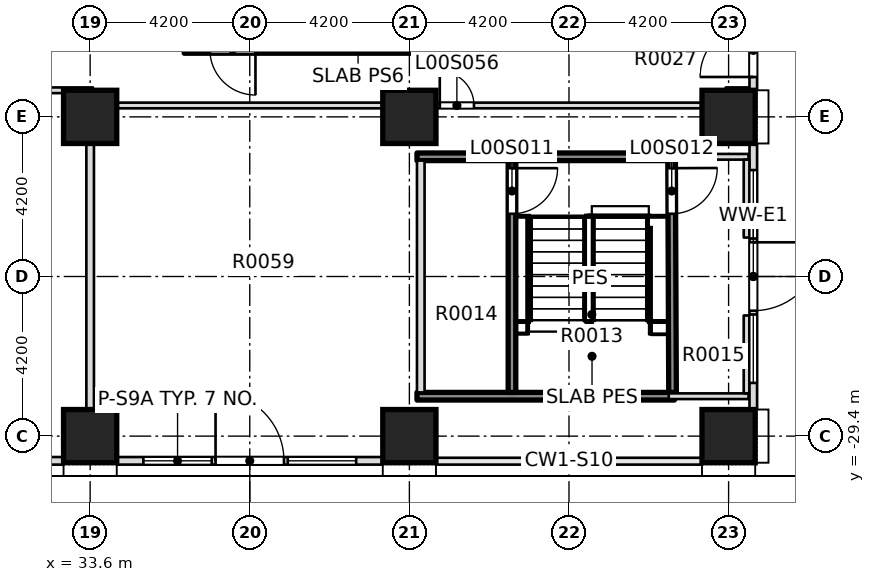
"""IFC4 building model, lengths in metres.
Left out: names, types, materials, properties, quantities, classifications, styles, units other than length and angle.
Written with IfcOpenShell. Run it as: python <this file> out.ifc"""

import sys

from ifc_helpers import new_model, si_unit, direction, frame, frame_2d, origin, origin_2d, place, context, subcontext, project, spatial, rectangle, extrude, element, fill, save


model = new_model("IFC4")
c1 = context("Model", 3, precision=1e-05, world=origin(), true_north=direction((0.0, 1.0)))
c2 = subcontext(c1, "Body", "Model", "MODEL_VIEW")
j1 = project(units=[si_unit("LENGTHUNIT", "METRE"), si_unit("PLANEANGLEUNIT", "RADIAN")], contexts=[c1])
p1 = place(None, origin())
s1 = spatial("IfcSite", under=j1, at=p1, CompositionType="ELEMENT")
p2 = place(p1, origin())
s2 = spatial("IfcBuilding", under=s1, at=p2, CompositionType="ELEMENT")
p3 = place(p2, origin())
s3 = spatial("IfcBuildingStorey", under=s2, at=p3, CompositionType="ELEMENT", Elevation=0.0)
for number, where, z_axis, x_axis in (
    (1, (33.6, -29.4, 0.0), (0.0, 0.0, 1.0), (1.0, 0.0, 0.0)),
    (2, (42.0, -29.4, 0.0), (0.0, 0.0, 1.0), (1.0, 0.0, 0.0)),
    (3, (50.4, -29.4, 0.0), (0.0, 0.0, 1.0), (1.0, 0.0, 0.0)),
    (4, (33.6, -21.0, 0.0), (0.0, 0.0, 1.0), (1.0, 0.0, 0.0)),
    (5, (42.0, -21.0, 0.0), (0.0, 0.0, 1.0), (1.0, 0.0, 0.0)),
    (6, (50.4, -21.0, 0.0), (0.0, 0.0, 1.0), (1.0, 0.0, 0.0)),
):
    element("IfcColumn", number, at=place(p3, frame(where, z_axis=z_axis, x_axis=x_axis)), inside=s3, PredefinedType="COLUMN", context=c2, shape_type="SweptSolid", body=[
        extrude(rectangle(XDim=1.4, YDim=1.4, at=origin_2d()), origin(), (0.0, 0.0, 1.0), 7.5),
    ])
p4 = place(p3, frame((42.2, -28.35, 0.0), z_axis=(0.0, 0.0, 1.0), x_axis=(1.0, 0.0, 0.0)))
e7 = element("IfcWall", 7, at=p4, inside=s3, PredefinedType="SOLIDWALL", context=c2, shape_type="SweptSolid", body=[
    extrude(rectangle(XDim=6.775, YDim=0.2, at=frame_2d((3.388, 0.0))), origin(), (0.0, 0.0, 1.0), 7.1),
])
p5 = place(p3, frame((48.825, -28.35, 0.0), z_axis=(0.0, 0.0, 1.0), x_axis=(1.0, 0.0, 0.0)))
e8 = element("IfcWall", 8, at=p5, inside=s3, PredefinedType="PARTITIONING", context=c2, shape_type="SweptSolid", body=[
    extrude(rectangle(XDim=2.1, YDim=0.15, at=frame_2d((1.05, 0.0))), origin(), (0.0, 0.0, 1.0), 7.1),
])
p6 = place(p3, frame((42.2, -22.05, 0.0), z_axis=(0.0, 0.0, 1.0), x_axis=(1.0, 0.0, 0.0)))
e9 = element("IfcWall", 9, at=p6, inside=s3, PredefinedType="SOLIDWALL", context=c2, shape_type="SweptSolid", body=[
    extrude(rectangle(XDim=6.775, YDim=0.2, at=frame_2d((3.388, 0.0))), origin(), (0.0, 0.0, 1.0), 7.1),
])
p7 = place(p3, frame((48.825, -22.05, 0.0), z_axis=(0.0, 0.0, 1.0), x_axis=(1.0, 0.0, 0.0)))
e10 = element("IfcWall", 10, at=p7, inside=s3, PredefinedType="PARTITIONING", context=c2, shape_type="SweptSolid", body=[
    extrude(rectangle(XDim=2.1, YDim=0.15, at=frame_2d((1.05, 0.0))), origin(), (0.0, 0.0, 1.0), 7.1),
])
p8 = place(p3, frame((33.5, -20.7, 0.0), z_axis=(0.0, 0.0, 1.0), x_axis=(1.0, 0.0, 0.0)))
e11 = element("IfcWall", 11, at=p8, inside=s3, PredefinedType="PARTITIONING", context=c2, shape_type="SweptSolid", body=[
    extrude(rectangle(XDim=16.975, YDim=0.15, at=frame_2d((8.488, 0.0))), origin(), (0.0, 0.0, 1.0), 7.1),
])
p9 = place(p8, frame((9.3, 0.0, 0.0)))
e12 = element("IfcOpeningElement", 12, at=p9, cuts=e11, PredefinedType="OPENING", context=c2, shape_type="SweptSolid", body=[
    extrude(rectangle(XDim=0.9, YDim=2.1, at=frame_2d((0.45, 1.05))), frame((0.0, 0.085, 0.0), z_axis=(0.0, -1.0, 0.0), x_axis=(1.0, 0.0, 0.0)), (0.0, 0.0, 1.0), 0.17),
])
p10 = place(p3, frame((-34.15, -20.3, 0.0), z_axis=(0.0, 0.0, 1.0), x_axis=(1.0, 0.0, 0.0)))
e13 = element("IfcWall", 13, at=p10, inside=s3, PredefinedType="PARTITIONING", context=c2, shape_type="SweptSolid", body=[
    extrude(rectangle(XDim=67.825, YDim=0.15, at=frame_2d((33.913, 0.0))), origin(), (0.0, 0.0, 1.0), 7.1),
])
p11 = place(p10, frame((12.6, 0.0, 0.0)))
e14 = element("IfcOpeningElement", 14, at=p11, cuts=e13, PredefinedType="OPENING", context=c2, shape_type="SweptSolid", body=[
    extrude(rectangle(XDim=1.1, YDim=2.1, at=frame_2d((0.55, 1.05))), frame((0.0, 0.085, 0.0), z_axis=(0.0, -1.0, 0.0), x_axis=(1.0, 0.0, 0.0)), (0.0, 0.0, 1.0), 0.17),
])
p12 = place(p10, frame((2.825, 0.0, 0.0)))
e15 = element("IfcOpeningElement", 15, at=p12, cuts=e13, PredefinedType="OPENING", context=c2, shape_type="SweptSolid", body=[
    extrude(rectangle(XDim=0.9, YDim=2.1, at=frame_2d((0.45, 1.05))), frame((0.0, 0.085, 0.0), z_axis=(0.0, -1.0, 0.0), x_axis=(1.0, 0.0, 0.0)), (0.0, 0.0, 1.0), 0.17),
])
p13 = place(p10, frame((7.25, 0.0, 0.0)))
e16 = element("IfcOpeningElement", 16, at=p13, cuts=e13, PredefinedType="OPENING", context=c2, shape_type="SweptSolid", body=[
    extrude(rectangle(XDim=0.9, YDim=2.1, at=frame_2d((0.45, 1.05))), frame((0.0, 0.085, 0.0), z_axis=(0.0, -1.0, 0.0), x_axis=(1.0, 0.0, 0.0)), (0.0, 0.0, 1.0), 0.17),
])
p14 = place(p10, frame((20.8, 0.0, 0.0)))
e17 = element("IfcOpeningElement", 17, at=p14, cuts=e13, PredefinedType="OPENING", context=c2, shape_type="SweptSolid", body=[
    extrude(rectangle(XDim=0.9, YDim=2.1, at=frame_2d((0.45, 1.05))), frame((0.0, 0.085, 0.0), z_axis=(0.0, -1.0, 0.0), x_axis=(1.0, 0.0, 0.0)), (0.0, 0.0, 1.0), 0.17),
])
p15 = place(p10, frame((27.4, 0.0, 0.0)))
e18 = element("IfcOpeningElement", 18, at=p15, cuts=e13, PredefinedType="OPENING", context=c2, shape_type="SweptSolid", body=[
    extrude(rectangle(XDim=0.9, YDim=2.1, at=frame_2d((0.45, 1.05))), frame((0.0, 0.085, 0.0), z_axis=(0.0, -1.0, 0.0), x_axis=(1.0, 0.0, 0.0)), (0.0, 0.0, 1.0), 0.17),
])
p16 = place(p10, frame((36.25, 0.0, 0.0)))
e19 = element("IfcOpeningElement", 19, at=p16, cuts=e13, PredefinedType="OPENING", context=c2, shape_type="SweptSolid", body=[
    extrude(rectangle(XDim=0.9, YDim=2.1, at=frame_2d((0.45, 1.05))), frame((0.0, 0.085, 0.0), z_axis=(0.0, -1.0, 0.0), x_axis=(1.0, 0.0, 0.0)), (0.0, 0.0, 1.0), 0.17),
])
p17 = place(p10, frame((46.65, 0.0, 0.0)))
e20 = element("IfcOpeningElement", 20, at=p17, cuts=e13, PredefinedType="OPENING", context=c2, shape_type="SweptSolid", body=[
    extrude(rectangle(XDim=0.9, YDim=2.1, at=frame_2d((0.45, 1.05))), frame((0.0, 0.085, 0.0), z_axis=(0.0, -1.0, 0.0), x_axis=(1.0, 0.0, 0.0)), (0.0, 0.0, 1.0), 0.17),
])
p18 = place(p10, frame((54.6, 0.0, 0.0)))
e21 = element("IfcOpeningElement", 21, at=p18, cuts=e13, PredefinedType="OPENING", context=c2, shape_type="SweptSolid", body=[
    extrude(rectangle(XDim=1.1, YDim=2.1, at=frame_2d((0.55, 1.05))), frame((0.0, 0.085, 0.0), z_axis=(0.0, -1.0, 0.0), x_axis=(1.0, 0.0, 0.0)), (0.0, 0.0, 1.0), 0.17),
])
p19 = place(p10, frame((63.1, 0.0, 0.0)))
e22 = element("IfcOpeningElement", 22, at=p19, cuts=e13, PredefinedType="OPENING", context=c2, shape_type="SweptSolid", body=[
    extrude(rectangle(XDim=0.9, YDim=2.1, at=frame_2d((0.45, 1.05))), frame((0.0, 0.085, 0.0), z_axis=(0.0, -1.0, 0.0), x_axis=(1.0, 0.0, 0.0)), (0.0, 0.0, 1.0), 0.17),
])
p20 = place(p3, frame((50.325, -20.3, 0.0), z_axis=(0.0, 0.0, 1.0), x_axis=(1.0, 0.0, 0.0)))
e23 = element("IfcWall", 23, at=p20, inside=s3, PredefinedType="PARTITIONING", context=c2, shape_type="SweptSolid", body=[
    extrude(rectangle(XDim=0.625, YDim=0.15, at=frame_2d((0.312, 0.0))), origin(), (0.0, 0.0, 1.0), 7.1),
])
p21 = place(p3, frame((36.075, -19.225, 0.0), z_axis=(0.0, 0.0, 1.0), x_axis=(1.0, 0.0, 0.0)))
e24 = element("IfcWall", 24, at=p21, inside=s3, PredefinedType="SOLIDWALL", context=c2, shape_type="SweptSolid", body=[
    extrude(rectangle(XDim=6.75, YDim=0.2, at=frame_2d((3.375, 0.0))), origin(), (0.0, 0.0, 1.0), 7.1),
])
p22 = place(p21, frame((0.675, 0.0, 0.0)))
e25 = element("IfcOpeningElement", 25, at=p22, cuts=e24, PredefinedType="OPENING", context=c2, shape_type="SweptSolid", body=[
    extrude(rectangle(XDim=1.2, YDim=2.1, at=frame_2d((0.6, 1.05))), frame((0.0, 0.11, 0.0), z_axis=(0.0, -1.0, 0.0), x_axis=(1.0, 0.0, 0.0)), (0.0, 0.0, 1.0), 0.22),
])
p23 = place(p3, frame((33.6, -29.95, 0.0), z_axis=(0.0, 0.0, 1.0), x_axis=(0.0, 1.0, 0.0)))
e26 = element("IfcWall", 26, at=p23, inside=s3, PredefinedType="PARTITIONING", context=c2, shape_type="SweptSolid", body=[
    extrude(rectangle(XDim=9.175, YDim=0.2, at=frame_2d((4.587, 0.0))), origin(), (0.0, 0.0, 1.0), 7.1),
])
p24 = place(p3, frame((33.6, -20.625, 0.0), z_axis=(0.0, 0.0, 1.0), x_axis=(0.0, 1.0, 0.0)))
e27 = element("IfcWall", 27, at=p24, inside=s3, PredefinedType="PARTITIONING", context=c2, shape_type="SweptSolid", body=[
    extrude(rectangle(XDim=0.25, YDim=0.15, at=frame_2d((0.125, 0.0))), origin(), (0.0, 0.0, 1.0), 7.1),
])
p25 = place(p3, frame((42.3, -28.25, 0.0), z_axis=(0.0, 0.0, 1.0), x_axis=(0.0, 1.0, 0.0)))
e28 = element("IfcWall", 28, at=p25, inside=s3, PredefinedType="PARTITIONING", context=c2, shape_type="SweptSolid", body=[
    extrude(rectangle(XDim=6.1, YDim=0.2, at=frame_2d((3.05, 0.0))), origin(), (0.0, 0.0, 1.0), 7.1),
])
p26 = place(p3, frame((44.7, -28.25, 0.0), z_axis=(0.0, 0.0, 1.0), x_axis=(0.0, 1.0, 0.0)))
e29 = element("IfcWall", 29, at=p26, inside=s3, PredefinedType="SOLIDWALL", context=c2, shape_type="SweptSolid", body=[
    extrude(rectangle(XDim=6.1, YDim=0.2, at=frame_2d((3.05, 0.0))), origin(), (0.0, 0.0, 1.0), 7.1),
])
p27 = place(p26, frame((4.7, 0.0, 0.0)))
e30 = element("IfcOpeningElement", 30, at=p27, cuts=e29, PredefinedType="OPENING", context=c2, shape_type="SweptSolid", body=[
    extrude(rectangle(XDim=1.2, YDim=2.1, at=frame_2d((0.6, 1.05))), frame((0.0, 0.11, 0.0), z_axis=(0.0, -1.0, 0.0), x_axis=(1.0, 0.0, 0.0)), (0.0, 0.0, 1.0), 0.22),
])
p28 = place(p3, frame((48.925, -28.25, 0.0), z_axis=(0.0, 0.0, 1.0), x_axis=(-0.004065655173, 0.99999173519, 0.0)))
e31 = element("IfcWall", 31, at=p28, inside=s3, PredefinedType="SOLIDWALL", context=c2, shape_type="SweptSolid", body=[
    extrude(rectangle(XDim=6.125, YDim=0.2, at=frame_2d((3.062, 0.0))), origin(), (0.0, 0.0, 1.0), 7.1),
])
p29 = place(p28, frame((4.7, 0.0, 0.0)))
e32 = element("IfcOpeningElement", 32, at=p29, cuts=e31, PredefinedType="OPENING", context=c2, shape_type="SweptSolid", body=[
    extrude(rectangle(XDim=1.2, YDim=2.1, at=frame_2d((0.6, 1.05))), frame((0.0, 0.11, 0.0), z_axis=(0.0, -1.0, 0.0), x_axis=(1.0, 0.0, 0.0)), (0.0, 0.0, 1.0), 0.22),
])
p30 = place(p3, frame((50.4, -20.625, 0.0), z_axis=(0.0, 0.0, 1.0), x_axis=(0.0, 1.0, 0.0)))
e33 = element("IfcWall", 33, at=p30, inside=s3, PredefinedType="PARTITIONING", context=c2, shape_type="SweptSolid", body=[
    extrude(rectangle(XDim=0.25, YDim=0.15, at=frame_2d((0.125, 0.0))), origin(), (0.0, 0.0, 1.0), 7.1),
])
p31 = place(p3, frame((50.873, -28.275, 0.0), z_axis=(0.0, 0.0, 1.0), x_axis=(0.0, 1.0, 0.0)))
e34 = element("IfcWall", 34, at=p31, inside=s3, PredefinedType="PARTITIONING", context=c2, shape_type="SweptSolid", body=[
    extrude(rectangle(XDim=2.05, YDim=0.15, at=frame_2d((1.025, 0.0))), origin(), (0.0, 0.0, 1.0), 7.1),
])
p32 = place(p3, frame((32.9, -30.05, 0.0), z_axis=(0.0, 0.0, 1.0), x_axis=(-1.0, 0.0, 0.0)))
e35 = element("IfcWall", 35, at=p32, inside=s3, PredefinedType="STANDARD", context=c2, shape_type="SweptSolid", body=[
    extrude(rectangle(XDim=7.0, YDim=0.2, at=frame_2d((3.5, 0.0))), origin(), (0.0, 0.0, 1.0), 7.1),
])
p33 = place(p32, frame((4.8, 0.0, 0.3)))
e36 = element("IfcOpeningElement", 36, at=p33, cuts=e35, PredefinedType="OPENING", context=c2, shape_type="SweptSolid", body=[
    extrude(rectangle(XDim=1.8, YDim=4.2, at=frame_2d((0.9, 2.1))), frame((0.0, 0.11, 0.0), z_axis=(0.0, -1.0, 0.0), x_axis=(1.0, 0.0, 0.0)), (0.0, 0.0, 1.0), 0.22),
])
p34 = place(p32, frame((2.3, 0.0, 0.0)))
e37 = element("IfcOpeningElement", 37, at=p34, cuts=e35, PredefinedType="OPENING", context=c2, shape_type="SweptSolid", body=[
    extrude(rectangle(XDim=2.4, YDim=2.4, at=frame_2d((1.2, 1.2))), frame((0.0, 0.11, 0.0), z_axis=(0.0, -1.0, 0.0), x_axis=(1.0, 0.0, 0.0)), (0.0, 0.0, 1.0), 0.22),
])
p35 = place(p32, frame((0.4, 0.0, 0.3)))
e38 = element("IfcOpeningElement", 38, at=p35, cuts=e35, PredefinedType="OPENING", context=c2, shape_type="SweptSolid", body=[
    extrude(rectangle(XDim=1.8, YDim=4.2, at=frame_2d((0.9, 2.1))), frame((0.0, 0.11, 0.0), z_axis=(0.0, -1.0, 0.0), x_axis=(1.0, 0.0, 0.0)), (0.0, 0.0, 1.0), 0.22),
])
p36 = place(p3, frame((41.3, -30.05, 0.0), z_axis=(0.0, 0.0, 1.0), x_axis=(-1.0, 0.0, 0.0)))
e39 = element("IfcWall", 39, at=p36, inside=s3, PredefinedType="STANDARD", context=c2, shape_type="SweptSolid", body=[
    extrude(rectangle(XDim=7.0, YDim=0.2, at=frame_2d((3.5, 0.0))), origin(), (0.0, 0.0, 1.0), 7.1),
])
p37 = place(p36, frame((4.5, 0.0, 0.3)))
e40 = element("IfcOpeningElement", 40, at=p37, cuts=e39, PredefinedType="OPENING", context=c2, shape_type="SweptSolid", body=[
    extrude(rectangle(XDim=1.8, YDim=4.2, at=frame_2d((0.9, 2.1))), frame((0.0, 0.11, 0.0), z_axis=(0.0, -1.0, 0.0), x_axis=(1.0, 0.0, 0.0)), (0.0, 0.0, 1.0), 0.22),
])
p38 = place(p36, frame((2.6, 0.0, 0.0)))
e41 = element("IfcOpeningElement", 41, at=p38, cuts=e39, PredefinedType="OPENING", context=c2, shape_type="SweptSolid", body=[
    extrude(rectangle(XDim=1.8, YDim=2.4, at=frame_2d((0.9, 1.2))), frame((0.0, 0.11, 0.0), z_axis=(0.0, -1.0, 0.0), x_axis=(1.0, 0.0, 0.0)), (0.0, 0.0, 1.0), 0.22),
])
p39 = place(p36, frame((0.7, 0.0, 0.3)))
e42 = element("IfcOpeningElement", 42, at=p39, cuts=e39, PredefinedType="OPENING", context=c2, shape_type="SweptSolid", body=[
    extrude(rectangle(XDim=1.8, YDim=4.2, at=frame_2d((0.9, 2.1))), frame((0.0, 0.11, 0.0), z_axis=(0.0, -1.0, 0.0), x_axis=(1.0, 0.0, 0.0)), (0.0, 0.0, 1.0), 0.22),
])
p40 = place(p3, frame((51.05, -21.7, 0.0), z_axis=(0.0, 0.0, 1.0), x_axis=(0.0, -1.0, 0.0)))
e43 = element("IfcWall", 43, at=p40, inside=s3, PredefinedType="STANDARD", context=c2, shape_type="SweptSolid", body=[
    extrude(rectangle(XDim=7.0, YDim=0.2, at=frame_2d((3.5, 0.0))), origin(), (0.0, 0.0, 1.0), 7.1),
])
p41 = place(p40, frame((4.5, 0.0, 0.3)))
e44 = element("IfcOpeningElement", 44, at=p41, cuts=e43, PredefinedType="OPENING", context=c2, shape_type="SweptSolid", body=[
    extrude(rectangle(XDim=1.8, YDim=4.2, at=frame_2d((0.9, 2.1))), frame((0.0, 0.11, 0.0), z_axis=(0.0, -1.0, 0.0), x_axis=(1.0, 0.0, 0.0)), (0.0, 0.0, 1.0), 0.22),
])
p42 = place(p40, frame((2.6, 0.0, 0.0)))
e45 = element("IfcOpeningElement", 45, at=p42, cuts=e43, PredefinedType="OPENING", context=c2, shape_type="SweptSolid", body=[
    extrude(rectangle(XDim=1.8, YDim=2.4, at=frame_2d((0.9, 1.2))), frame((0.0, 0.11, 0.0), z_axis=(0.0, -1.0, 0.0), x_axis=(1.0, 0.0, 0.0)), (0.0, 0.0, 1.0), 0.22),
])
p43 = place(p40, frame((0.7, 0.0, 0.3)))
e46 = element("IfcOpeningElement", 46, at=p43, cuts=e43, PredefinedType="OPENING", context=c2, shape_type="SweptSolid", body=[
    extrude(rectangle(XDim=1.8, YDim=4.2, at=frame_2d((0.9, 2.1))), frame((0.0, 0.11, 0.0), z_axis=(0.0, -1.0, 0.0), x_axis=(1.0, 0.0, 0.0)), (0.0, 0.0, 1.0), 0.22),
])
p44 = place(p3, frame((51.05, -13.3, 0.0), z_axis=(0.0, 0.0, 1.0), x_axis=(0.0, -1.0, 0.0)))
e47 = element("IfcWall", 47, at=p44, inside=s3, PredefinedType="STANDARD", context=c2, shape_type="SweptSolid", body=[
    extrude(rectangle(XDim=7.0, YDim=0.2, at=frame_2d((3.5, 0.0))), origin(), (0.0, 0.0, 1.0), 7.1),
])
p45 = place(p44, frame((1.08, 0.0, 0.3)))
e48 = element("IfcOpeningElement", 48, at=p45, cuts=e47, PredefinedType="OPENING", context=c2, shape_type="SweptSolid", body=[
    extrude(rectangle(XDim=3.6, YDim=4.2, at=frame_2d((1.8, 2.1))), frame((0.0, 0.11, 0.0), z_axis=(0.0, -1.0, 0.0), x_axis=(1.0, 0.0, 0.0)), (0.0, 0.0, 1.0), 0.22),
])
p46 = place(p44, frame((5.25, 0.0, 0.0)))
e49 = element("IfcOpeningElement", 49, at=p46, cuts=e47, PredefinedType="OPENING", context=c2, shape_type="SweptSolid", body=[
    extrude(rectangle(XDim=1.4, YDim=2.1, at=frame_2d((0.7, 1.05))), frame((0.0, 0.11, 0.0), z_axis=(0.0, -1.0, 0.0), x_axis=(1.0, 0.0, 0.0)), (0.0, 0.0, 1.0), 0.22),
])
p47 = place(p3, frame((50.873, -24.175, 0.0), z_axis=(0.0, 0.0, 1.0), x_axis=(0.0, 1.0, 0.0)))
e50 = element("IfcWall", 50, at=p47, inside=s3, PredefinedType="PARTITIONING", context=c2, shape_type="SweptSolid", body=[
    extrude(rectangle(XDim=2.05, YDim=0.15, at=frame_2d((1.025, 0.0))), origin(), (0.0, 0.0, 1.0), 7.1),
])
p48 = place(p27, origin())
e51 = element("IfcDoor", 51, at=p48, inside=s3, OperationType="DOUBLE_DOOR_SINGLE_SWING", PredefinedType="DOOR", context=c2, shape_type="SweptSolid", body=[
    extrude(rectangle(XDim=1.2, YDim=2.1, at=frame_2d((0.6, 1.05))), frame((0.0, 0.025, 0.0), z_axis=(0.0, -1.0, 0.0), x_axis=(1.0, 0.0, 0.0)), (0.0, 0.0, 1.0), 0.05),
])
fill(e30, e51)
p49 = place(p29, origin())
e52 = element("IfcDoor", 52, at=p49, inside=s3, OperationType="DOUBLE_DOOR_SINGLE_SWING", PredefinedType="DOOR", context=c2, shape_type="SweptSolid", body=[
    extrude(rectangle(XDim=1.2, YDim=2.1, at=frame_2d((0.6, 1.05))), frame((0.0, 0.025, 0.0), z_axis=(0.0, -1.0, 0.0), x_axis=(1.0, 0.0, 0.0)), (0.0, 0.0, 1.0), 0.05),
])
fill(e32, e52)
p50 = place(p9, origin())
e53 = element("IfcDoor", 53, at=p50, inside=s3, OperationType="SINGLE_SWING_RIGHT", PredefinedType="DOOR", context=c2, shape_type="SweptSolid", body=[
    extrude(rectangle(XDim=0.9, YDim=2.1, at=frame_2d((0.45, 1.05))), frame((0.0, 0.025, 0.0), z_axis=(0.0, -1.0, 0.0), x_axis=(1.0, 0.0, 0.0)), (0.0, 0.0, 1.0), 0.05),
])
fill(e12, e53)
p51 = place(p37, origin())
e54 = element("IfcWindow", 54, at=p51, inside=s3, PartitioningType="SINGLE_PANEL", PredefinedType="WINDOW", context=c2, shape_type="SweptSolid", body=[
    extrude(rectangle(XDim=1.8, YDim=4.2, at=frame_2d((0.9, 2.1))), frame((0.0, 0.03, 0.0), z_axis=(0.0, -1.0, 0.0), x_axis=(1.0, 0.0, 0.0)), (0.0, 0.0, 1.0), 0.06),
])
fill(e40, e54)
p52 = place(p38, origin())
e55 = element("IfcDoor", 55, at=p52, inside=s3, OperationType="SINGLE_SWING_LEFT", PredefinedType="DOOR", context=c2, shape_type="SweptSolid", body=[
    extrude(rectangle(XDim=1.8, YDim=2.4, at=frame_2d((0.9, 1.2))), frame((0.0, 0.025, 0.0), z_axis=(0.0, -1.0, 0.0), x_axis=(1.0, 0.0, 0.0)), (0.0, 0.0, 1.0), 0.05),
])
fill(e41, e55)
p53 = place(p39, origin())
e56 = element("IfcWindow", 56, at=p53, inside=s3, PartitioningType="SINGLE_PANEL", PredefinedType="WINDOW", context=c2, shape_type="SweptSolid", body=[
    extrude(rectangle(XDim=1.8, YDim=4.2, at=frame_2d((0.9, 2.1))), frame((0.0, 0.03, 0.0), z_axis=(0.0, -1.0, 0.0), x_axis=(1.0, 0.0, 0.0)), (0.0, 0.0, 1.0), 0.06),
])
fill(e42, e56)
p54 = place(p41, origin())
e57 = element("IfcWindow", 57, at=p54, inside=s3, PartitioningType="SINGLE_PANEL", PredefinedType="WINDOW", context=c2, shape_type="SweptSolid", body=[
    extrude(rectangle(XDim=1.8, YDim=4.2, at=frame_2d((0.9, 2.1))), frame((0.0, 0.03, 0.0), z_axis=(0.0, -1.0, 0.0), x_axis=(1.0, 0.0, 0.0)), (0.0, 0.0, 1.0), 0.06),
])
fill(e44, e57)
p55 = place(p42, origin())
e58 = element("IfcDoor", 58, at=p55, inside=s3, OperationType="SINGLE_SWING_LEFT", PredefinedType="DOOR", context=c2, shape_type="SweptSolid", body=[
    extrude(rectangle(XDim=1.8, YDim=2.4, at=frame_2d((0.9, 1.2))), frame((0.0, 0.025, 0.0), z_axis=(0.0, -1.0, 0.0), x_axis=(1.0, 0.0, 0.0)), (0.0, 0.0, 1.0), 0.05),
])
fill(e45, e58)
p56 = place(p43, origin())
e59 = element("IfcWindow", 59, at=p56, inside=s3, PartitioningType="SINGLE_PANEL", PredefinedType="WINDOW", context=c2, shape_type="SweptSolid", body=[
    extrude(rectangle(XDim=1.8, YDim=4.2, at=frame_2d((0.9, 2.1))), frame((0.0, 0.03, 0.0), z_axis=(0.0, -1.0, 0.0), x_axis=(1.0, 0.0, 0.0)), (0.0, 0.0, 1.0), 0.06),
])
fill(e46, e59)
p57 = place(p46, origin())
e60 = element("IfcDoor", 60, at=p57, inside=s3, OperationType="SINGLE_SWING_LEFT", PredefinedType="DOOR", context=c2, shape_type="SweptSolid", body=[
    extrude(rectangle(XDim=1.4, YDim=2.1, at=frame_2d((0.7, 1.05))), frame((0.0, 0.025, 0.0), z_axis=(0.0, -1.0, 0.0), x_axis=(1.0, 0.0, 0.0)), (0.0, 0.0, 1.0), 0.05),
])
fill(e49, e60)
save(model, sys.argv[1])
